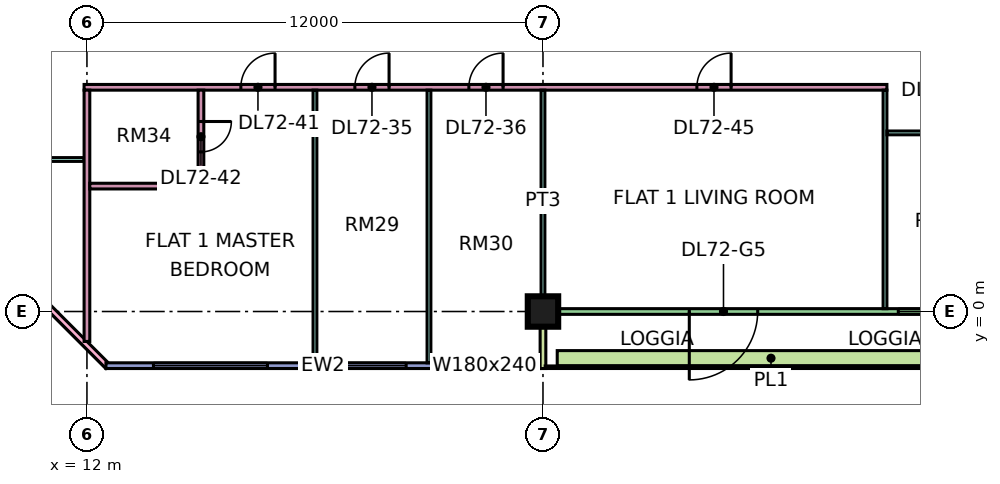
"""IFC4 building model, lengths in metres.
Left out: names, types, materials, properties, quantities, classifications, styles, units other than length and angle.
Written with IfcOpenShell. Run it as: python <this file> out.ifc"""

import sys

from ifc_helpers import new_model, si_unit, direction, frame, frame_2d, origin, origin_2d, place, context, subcontext, project, spatial, rectangle, extrude, element, fill, save


model = new_model("IFC4")
c1 = context("Model", 3, precision=1e-05, world=origin(), true_north=direction((0.0, 1.0)))
c2 = subcontext(c1, "Body", "Model", "MODEL_VIEW")
j1 = project(units=[si_unit("LENGTHUNIT", "METRE"), si_unit("PLANEANGLEUNIT", "RADIAN")], contexts=[c1])
p1 = place(None, origin())
s1 = spatial("IfcSite", under=j1, at=p1, CompositionType="ELEMENT")
p2 = place(p1, origin())
s2 = spatial("IfcBuilding", under=s1, at=p2, CompositionType="ELEMENT")
p3 = place(p2, frame((0.0, 0.0, 307.15)))
s3 = spatial("IfcBuildingStorey", under=s2, at=p3, CompositionType="ELEMENT", Elevation=307.15)
p4 = place(p3, frame((24.0, 0.0, 0.0), z_axis=(0.0, 0.0, 1.0), x_axis=(1.0, 0.0, 0.0)))
e1 = element("IfcColumn", 1, at=p4, inside=s3, PredefinedType="COLUMN", context=c2, shape_type="SweptSolid", body=[
    extrude(rectangle(XDim=0.8, YDim=0.8, at=origin_2d()), origin(), (0.0, 0.0, 1.0), 3.75),
])
p5 = place(p3, frame((-1.447, 12.553, 0.0), z_axis=(0.0, 0.0, 1.0), x_axis=(0.707106781187, -0.707106781187, 0.0)))
e2 = element("IfcWall", 2, at=p5, inside=s3, PredefinedType="SOLIDWALL", context=c2, shape_type="SweptSolid", body=[
    extrude(rectangle(XDim=19.799, YDim=0.15, at=frame_2d((9.899, 0.0))), origin(), (0.0, 0.0, 1.0), 3.35),
])
p6 = place(p5, frame((2.212, 0.0, 0.45)))
e3 = element("IfcOpeningElement", 3, at=p6, cuts=e2, PredefinedType="OPENING", context=c2, shape_type="SweptSolid", body=[
    extrude(rectangle(XDim=3.0, YDim=2.4, at=frame_2d((1.5, 1.2))), frame((0.0, 0.085, 0.0), z_axis=(0.0, -1.0, 0.0), x_axis=(1.0, 0.0, 0.0)), (0.0, 0.0, 1.0), 0.17),
])
p7 = place(p5, frame((10.216, 0.0, 0.45)))
e4 = element("IfcOpeningElement", 4, at=p7, cuts=e2, PredefinedType="OPENING", context=c2, shape_type="SweptSolid", body=[
    extrude(rectangle(XDim=3.0, YDim=2.4, at=frame_2d((1.5, 1.2))), frame((0.0, 0.085, 0.0), z_axis=(0.0, -1.0, 0.0), x_axis=(1.0, 0.0, 0.0)), (0.0, 0.0, 1.0), 0.17),
])
p8 = place(p3, frame((12.5, -1.425, 0.0), z_axis=(0.0, 0.0, 1.0), x_axis=(1.0, 0.0, 0.0)))
e5 = element("IfcWall", 5, at=p8, inside=s3, PredefinedType="SOLIDWALL", context=c2, shape_type="SweptSolid", body=[
    extrude(rectangle(XDim=11.425, YDim=0.15, at=frame_2d((5.712, 0.0))), origin(), (0.0, 0.0, 1.0), 3.35),
])
p9 = place(p8, frame((1.25, 0.0, 0.45)))
e6 = element("IfcOpeningElement", 6, at=p9, cuts=e5, PredefinedType="OPENING", context=c2, shape_type="SweptSolid", body=[
    extrude(rectangle(XDim=3.0, YDim=2.4, at=frame_2d((1.5, 1.2))), frame((0.0, 0.085, 0.0), z_axis=(0.0, -1.0, 0.0), x_axis=(1.0, 0.0, 0.0)), (0.0, 0.0, 1.0), 0.17),
])
p10 = place(p8, frame((6.1, 0.0, 0.45)))
e7 = element("IfcOpeningElement", 7, at=p10, cuts=e5, PredefinedType="OPENING", context=c2, shape_type="SweptSolid", body=[
    extrude(rectangle(XDim=1.8, YDim=2.4, at=frame_2d((0.9, 1.2))), frame((0.0, 0.085, 0.0), z_axis=(0.0, -1.0, 0.0), x_axis=(1.0, 0.0, 0.0)), (0.0, 0.0, 1.0), 0.17),
])
p11 = place(p8, frame((9.062, 0.0, 0.45)))
e8 = element("IfcOpeningElement", 8, at=p11, cuts=e5, PredefinedType="OPENING", context=c2, shape_type="SweptSolid", body=[
    extrude(rectangle(XDim=1.8, YDim=2.4, at=frame_2d((0.9, 1.2))), frame((0.0, 0.085, 0.0), z_axis=(0.0, -1.0, 0.0), x_axis=(1.0, 0.0, 0.0)), (0.0, 0.0, 1.0), 0.17),
])
p12 = place(p3, frame((24.075, 0.0, 0.0), z_axis=(0.0, 0.0, 1.0), x_axis=(1.0, 0.0, 0.0)))
e9 = element("IfcWall", 9, at=p12, inside=s3, PredefinedType="SOLIDWALL", context=c2, shape_type="SweptSolid", body=[
    extrude(rectangle(XDim=11.85, YDim=0.15, at=frame_2d((5.925, 0.0))), origin(), (0.0, 0.0, 1.0), 3.35),
])
p13 = place(p12, frame((3.775, 0.0, 0.0)))
e10 = element("IfcOpeningElement", 10, at=p13, cuts=e9, PredefinedType="OPENING", context=c2, shape_type="SweptSolid", body=[
    extrude(rectangle(XDim=1.8, YDim=2.4, at=frame_2d((0.9, 1.2))), frame((0.0, 0.085, 0.0), z_axis=(0.0, -1.0, 0.0), x_axis=(1.0, 0.0, 0.0)), (0.0, 0.0, 1.0), 0.17),
])
p14 = place(p12, frame((9.275, 0.0, 0.45)))
e11 = element("IfcOpeningElement", 11, at=p14, cuts=e9, PredefinedType="OPENING", context=c2, shape_type="SweptSolid", body=[
    extrude(rectangle(XDim=1.8, YDim=2.4, at=frame_2d((0.9, 1.2))), frame((0.0, 0.085, 0.0), z_axis=(0.0, -1.0, 0.0), x_axis=(1.0, 0.0, 0.0)), (0.0, 0.0, 1.0), 0.17),
])
p15 = place(p3, frame((24.0, -1.5, 0.0), z_axis=(0.0, 0.0, 1.0), x_axis=(0.0, 1.0, 0.0)))
e12 = element("IfcWall", 12, at=p15, inside=s3, PredefinedType="SOLIDWALL", context=c2, shape_type="SweptSolid", body=[
    extrude(rectangle(XDim=1.5, YDim=0.15, at=frame_2d((0.75, 0.0))), origin(), (0.0, 0.0, 1.0), 3.35),
])
p16 = place(p3, frame((24.375, -1.229, 0.0), z_axis=(0.0, 0.0, 1.0), x_axis=(1.0, 0.0, 0.0)))
e13 = element("IfcWall", 13, at=p16, inside=s3, PredefinedType="SOLIDWALL", context=c2, shape_type="SweptSolid", body=[
    extrude(rectangle(XDim=11.25, YDim=0.4, at=frame_2d((5.625, 0.0))), origin(), (0.0, 0.0, 1.0), 0.7),
])
p17 = place(p3, frame((9.05, 4.0, 0.0), z_axis=(0.0, 0.0, 1.0), x_axis=(1.0, 0.0, 0.0)))
e14 = element("IfcWall", 14, at=p17, inside=s3, PredefinedType="PARTITIONING", context=c2, shape_type="SweptSolid", body=[
    extrude(rectangle(XDim=2.875, YDim=0.1, at=frame_2d((1.438, 0.0))), origin(), (0.0, 0.0, 1.0), 3.35),
])
p18 = place(p3, frame((11.925, 5.9, 0.0), z_axis=(0.0, 0.0, 1.0), x_axis=(1.0, 0.0, 0.0)))
e15 = element("IfcWall", 15, at=p18, inside=s3, PredefinedType="PARTITIONING", context=c2, shape_type="SweptSolid", body=[
    extrude(rectangle(XDim=21.125, YDim=0.15, at=frame_2d((10.562, 0.0))), origin(), (0.0, 0.0, 1.0), 3.35),
])
p19 = place(p18, frame((7.125, 0.0, 0.0)))
e16 = element("IfcOpeningElement", 16, at=p19, cuts=e15, PredefinedType="OPENING", context=c2, shape_type="SweptSolid", body=[
    extrude(rectangle(XDim=0.9, YDim=2.1, at=frame_2d((0.45, 1.05))), frame((0.0, 0.085, 0.0), z_axis=(0.0, -1.0, 0.0), x_axis=(1.0, 0.0, 0.0)), (0.0, 0.0, 1.0), 0.17),
])
p20 = place(p18, frame((10.125, 0.0, 0.0)))
e17 = element("IfcOpeningElement", 17, at=p20, cuts=e15, PredefinedType="OPENING", context=c2, shape_type="SweptSolid", body=[
    extrude(rectangle(XDim=0.9, YDim=2.1, at=frame_2d((0.45, 1.05))), frame((0.0, 0.085, 0.0), z_axis=(0.0, -1.0, 0.0), x_axis=(1.0, 0.0, 0.0)), (0.0, 0.0, 1.0), 0.17),
])
p21 = place(p18, frame((4.125, 0.0, 0.0)))
e18 = element("IfcOpeningElement", 18, at=p21, cuts=e15, PredefinedType="OPENING", context=c2, shape_type="SweptSolid", body=[
    extrude(rectangle(XDim=0.9, YDim=2.1, at=frame_2d((0.45, 1.05))), frame((0.0, 0.085, 0.0), z_axis=(0.0, -1.0, 0.0), x_axis=(1.0, 0.0, 0.0)), (0.0, 0.0, 1.0), 0.17),
])
p22 = place(p18, frame((16.125, 0.0, 0.0)))
e19 = element("IfcOpeningElement", 19, at=p22, cuts=e15, PredefinedType="OPENING", context=c2, shape_type="SweptSolid", body=[
    extrude(rectangle(XDim=0.9, YDim=2.1, at=frame_2d((0.45, 1.05))), frame((0.0, 0.085, 0.0), z_axis=(0.0, -1.0, 0.0), x_axis=(1.0, 0.0, 0.0)), (0.0, 0.0, 1.0), 0.17),
])
p23 = place(p3, frame((12.0, -0.788, 0.0), z_axis=(0.0, 0.0, 1.0), x_axis=(0.0, 1.0, 0.0)))
e20 = element("IfcWall", 20, at=p23, inside=s3, PredefinedType="PARTITIONING", context=c2, shape_type="SweptSolid", body=[
    extrude(rectangle(XDim=6.613, YDim=0.15, at=frame_2d((3.306, 0.0))), origin(), (0.0, 0.0, 1.0), 3.35),
])
p24 = place(p3, frame((12.075, 3.3, 0.0), z_axis=(0.0, 0.0, 1.0), x_axis=(1.0, 0.0, 0.0)))
e21 = element("IfcWall", 21, at=p24, inside=s3, PredefinedType="PARTITIONING", context=c2, shape_type="SweptSolid", body=[
    extrude(rectangle(XDim=3.0, YDim=0.15, at=frame_2d((1.5, 0.0))), origin(), (0.0, 0.0, 1.0), 3.35),
])
p25 = place(p3, frame((15.0, 3.375, 0.0), z_axis=(0.0, 0.0, 1.0), x_axis=(0.0, 1.0, 0.0)))
e22 = element("IfcWall", 22, at=p25, inside=s3, PredefinedType="PARTITIONING", context=c2, shape_type="SweptSolid", body=[
    extrude(rectangle(XDim=2.45, YDim=0.15, at=frame_2d((1.225, 0.0))), origin(), (0.0, 0.0, 1.0), 3.35),
])
p26 = place(p25, frame((0.825, 0.0, 0.0)))
e23 = element("IfcOpeningElement", 23, at=p26, cuts=e22, PredefinedType="OPENING", context=c2, shape_type="SweptSolid", body=[
    extrude(rectangle(XDim=0.8, YDim=2.1, at=frame_2d((0.4, 1.05))), frame((0.0, 0.085, 0.0), z_axis=(0.0, -1.0, 0.0), x_axis=(1.0, 0.0, 0.0)), (0.0, 0.0, 1.0), 0.17),
])
for number, where, z_axis, x_axis in (
    (24, (18.0, -1.351, 0.0), (0.0, 0.0, 1.0), (0.0, 1.0, 0.0)),
    (25, (21.0, -1.351, 0.0), (0.0, 0.0, 1.0), (0.0, 1.0, 0.0)),
):
    element("IfcWall", number, at=place(p3, frame(where, z_axis=z_axis, x_axis=x_axis)), inside=s3, PredefinedType="PARTITIONING", context=c2, shape_type="SweptSolid", body=[
        extrude(rectangle(XDim=7.176, YDim=0.1, at=frame_2d((3.588, 0.0))), origin(), (0.0, 0.0, 1.0), 3.35),
    ])
p27 = place(p3, frame((24.0, 0.0, 0.0), z_axis=(0.0, 0.0, 1.0), x_axis=(0.0, 1.0, 0.0)))
e26 = element("IfcWall", 26, at=p27, inside=s3, PredefinedType="PARTITIONING", context=c2, shape_type="SweptSolid", body=[
    extrude(rectangle(XDim=5.825, YDim=0.1, at=frame_2d((2.913, 0.0))), origin(), (0.0, 0.0, 1.0), 3.35),
])
p28 = place(p3, frame((33.0, 0.074, 0.0), z_axis=(0.0, 0.0, 1.0), x_axis=(0.0, 1.0, 0.0)))
e27 = element("IfcWall", 27, at=p28, inside=s3, PredefinedType="PARTITIONING", context=c2, shape_type="SweptSolid", body=[
    extrude(rectangle(XDim=5.751, YDim=0.1, at=frame_2d((2.875, 0.0))), origin(), (0.0, 0.0, 1.0), 3.35),
])
p29 = place(p3, frame((33.05, 4.7, 0.0), z_axis=(0.0, 0.0, 1.0), x_axis=(1.0, 0.0, 0.0)))
e28 = element("IfcWall", 28, at=p29, inside=s3, PredefinedType="PARTITIONING", context=c2, shape_type="SweptSolid", body=[
    extrude(rectangle(XDim=14.85, YDim=0.1, at=frame_2d((7.425, 0.0))), origin(), (0.0, 0.0, 1.0), 3.35),
])
p30 = place(p29, frame((1.0, 0.0, 0.0)))
e29 = element("IfcOpeningElement", 29, at=p30, cuts=e28, PredefinedType="OPENING", context=c2, shape_type="SweptSolid", body=[
    extrude(rectangle(XDim=0.9, YDim=2.1, at=frame_2d((0.45, 1.05))), frame((0.0, 0.06, 0.0), z_axis=(0.0, -1.0, 0.0), x_axis=(1.0, 0.0, 0.0)), (0.0, 0.0, 1.0), 0.12),
])
p31 = place(p29, frame((13.0, 0.0, 0.0)))
e30 = element("IfcOpeningElement", 30, at=p31, cuts=e28, PredefinedType="OPENING", context=c2, shape_type="SweptSolid", body=[
    extrude(rectangle(XDim=0.9, YDim=2.1, at=frame_2d((0.45, 1.05))), frame((0.0, 0.06, 0.0), z_axis=(0.0, -1.0, 0.0), x_axis=(1.0, 0.0, 0.0)), (0.0, 0.0, 1.0), 0.12),
])
p32 = place(p29, frame((7.0, 0.0, 0.0)))
e31 = element("IfcOpeningElement", 31, at=p32, cuts=e28, PredefinedType="OPENING", context=c2, shape_type="SweptSolid", body=[
    extrude(rectangle(XDim=0.9, YDim=2.1, at=frame_2d((0.45, 1.05))), frame((0.0, 0.06, 0.0), z_axis=(0.0, -1.0, 0.0), x_axis=(1.0, 0.0, 0.0)), (0.0, 0.0, 1.0), 0.12),
])
p33 = place(p9, origin())
e32 = element("IfcWindow", 32, at=p33, inside=s3, PartitioningType="SINGLE_PANEL", PredefinedType="WINDOW", context=c2, shape_type="SweptSolid", body=[
    extrude(rectangle(XDim=3.0, YDim=2.4, at=frame_2d((1.5, 1.2))), frame((0.0, 0.03, 0.0), z_axis=(0.0, -1.0, 0.0), x_axis=(1.0, 0.0, 0.0)), (0.0, 0.0, 1.0), 0.06),
])
fill(e6, e32)
p34 = place(p10, origin())
e33 = element("IfcWindow", 33, at=p34, inside=s3, PartitioningType="SINGLE_PANEL", PredefinedType="WINDOW", context=c2, shape_type="SweptSolid", body=[
    extrude(rectangle(XDim=1.8, YDim=2.4, at=frame_2d((0.9, 1.2))), frame((0.0, 0.03, 0.0), z_axis=(0.0, -1.0, 0.0), x_axis=(1.0, 0.0, 0.0)), (0.0, 0.0, 1.0), 0.06),
])
fill(e7, e33)
p35 = place(p11, origin())
e34 = element("IfcWindow", 34, at=p35, inside=s3, PartitioningType="SINGLE_PANEL", PredefinedType="WINDOW", context=c2, shape_type="SweptSolid", body=[
    extrude(rectangle(XDim=1.8, YDim=2.4, at=frame_2d((0.9, 1.2))), frame((0.0, 0.03, 0.0), z_axis=(0.0, -1.0, 0.0), x_axis=(1.0, 0.0, 0.0)), (0.0, 0.0, 1.0), 0.06),
])
fill(e8, e34)
p36 = place(p13, frame((1.8, 0.0, 0.0), z_axis=(0.0, 0.0, 1.0), x_axis=(-1.0, 0.0, 0.0)))
e35 = element("IfcDoor", 35, at=p36, inside=s3, OperationType="DOUBLE_DOOR_SINGLE_SWING", PredefinedType="DOOR", context=c2, shape_type="SweptSolid", body=[
    extrude(rectangle(XDim=1.8, YDim=2.4, at=frame_2d((0.9, 1.2))), frame((0.0, 0.025, 0.0), z_axis=(0.0, -1.0, 0.0), x_axis=(1.0, 0.0, 0.0)), (0.0, 0.0, 1.0), 0.05),
])
fill(e10, e35)
p37 = place(p14, origin())
e36 = element("IfcWindow", 36, at=p37, inside=s3, PartitioningType="SINGLE_PANEL", PredefinedType="WINDOW", context=c2, shape_type="SweptSolid", body=[
    extrude(rectangle(XDim=1.8, YDim=2.4, at=frame_2d((0.9, 1.2))), frame((0.0, 0.03, 0.0), z_axis=(0.0, -1.0, 0.0), x_axis=(1.0, 0.0, 0.0)), (0.0, 0.0, 1.0), 0.06),
])
fill(e11, e36)
p38 = place(p19, frame((0.9, 0.0, 0.0), z_axis=(0.0, 0.0, 1.0), x_axis=(-1.0, 0.0, 0.0)))
e37 = element("IfcDoor", 37, at=p38, inside=s3, OperationType="SINGLE_SWING_RIGHT", PredefinedType="DOOR", context=c2, shape_type="SweptSolid", body=[
    extrude(rectangle(XDim=0.9, YDim=2.1, at=frame_2d((0.45, 1.05))), frame((0.0, 0.025, 0.0), z_axis=(0.0, -1.0, 0.0), x_axis=(1.0, 0.0, 0.0)), (0.0, 0.0, 1.0), 0.05),
])
fill(e16, e37)
p39 = place(p20, frame((0.9, 0.0, 0.0), z_axis=(0.0, 0.0, 1.0), x_axis=(-1.0, 0.0, 0.0)))
e38 = element("IfcDoor", 38, at=p39, inside=s3, OperationType="SINGLE_SWING_RIGHT", PredefinedType="DOOR", context=c2, shape_type="SweptSolid", body=[
    extrude(rectangle(XDim=0.9, YDim=2.1, at=frame_2d((0.45, 1.05))), frame((0.0, 0.025, 0.0), z_axis=(0.0, -1.0, 0.0), x_axis=(1.0, 0.0, 0.0)), (0.0, 0.0, 1.0), 0.05),
])
fill(e17, e38)
p40 = place(p21, frame((0.9, 0.0, 0.0), z_axis=(0.0, 0.0, 1.0), x_axis=(-1.0, 0.0, 0.0)))
e39 = element("IfcDoor", 39, at=p40, inside=s3, OperationType="SINGLE_SWING_RIGHT", PredefinedType="DOOR", context=c2, shape_type="SweptSolid", body=[
    extrude(rectangle(XDim=0.9, YDim=2.1, at=frame_2d((0.45, 1.05))), frame((0.0, 0.025, 0.0), z_axis=(0.0, -1.0, 0.0), x_axis=(1.0, 0.0, 0.0)), (0.0, 0.0, 1.0), 0.05),
])
fill(e18, e39)
p41 = place(p26, origin())
e40 = element("IfcDoor", 40, at=p41, inside=s3, OperationType="SINGLE_SWING_RIGHT", PredefinedType="DOOR", context=c2, shape_type="SweptSolid", body=[
    extrude(rectangle(XDim=0.8, YDim=2.1, at=frame_2d((0.4, 1.05))), frame((0.0, 0.025, 0.0), z_axis=(0.0, -1.0, 0.0), x_axis=(1.0, 0.0, 0.0)), (0.0, 0.0, 1.0), 0.05),
])
fill(e23, e40)
p42 = place(p22, frame((0.9, 0.0, 0.0), z_axis=(0.0, 0.0, 1.0), x_axis=(-1.0, 0.0, 0.0)))
e41 = element("IfcDoor", 41, at=p42, inside=s3, OperationType="SINGLE_SWING_RIGHT", PredefinedType="DOOR", context=c2, shape_type="SweptSolid", body=[
    extrude(rectangle(XDim=0.9, YDim=2.1, at=frame_2d((0.45, 1.05))), frame((0.0, 0.025, 0.0), z_axis=(0.0, -1.0, 0.0), x_axis=(1.0, 0.0, 0.0)), (0.0, 0.0, 1.0), 0.05),
])
fill(e19, e41)
save(model, sys.argv[1])
